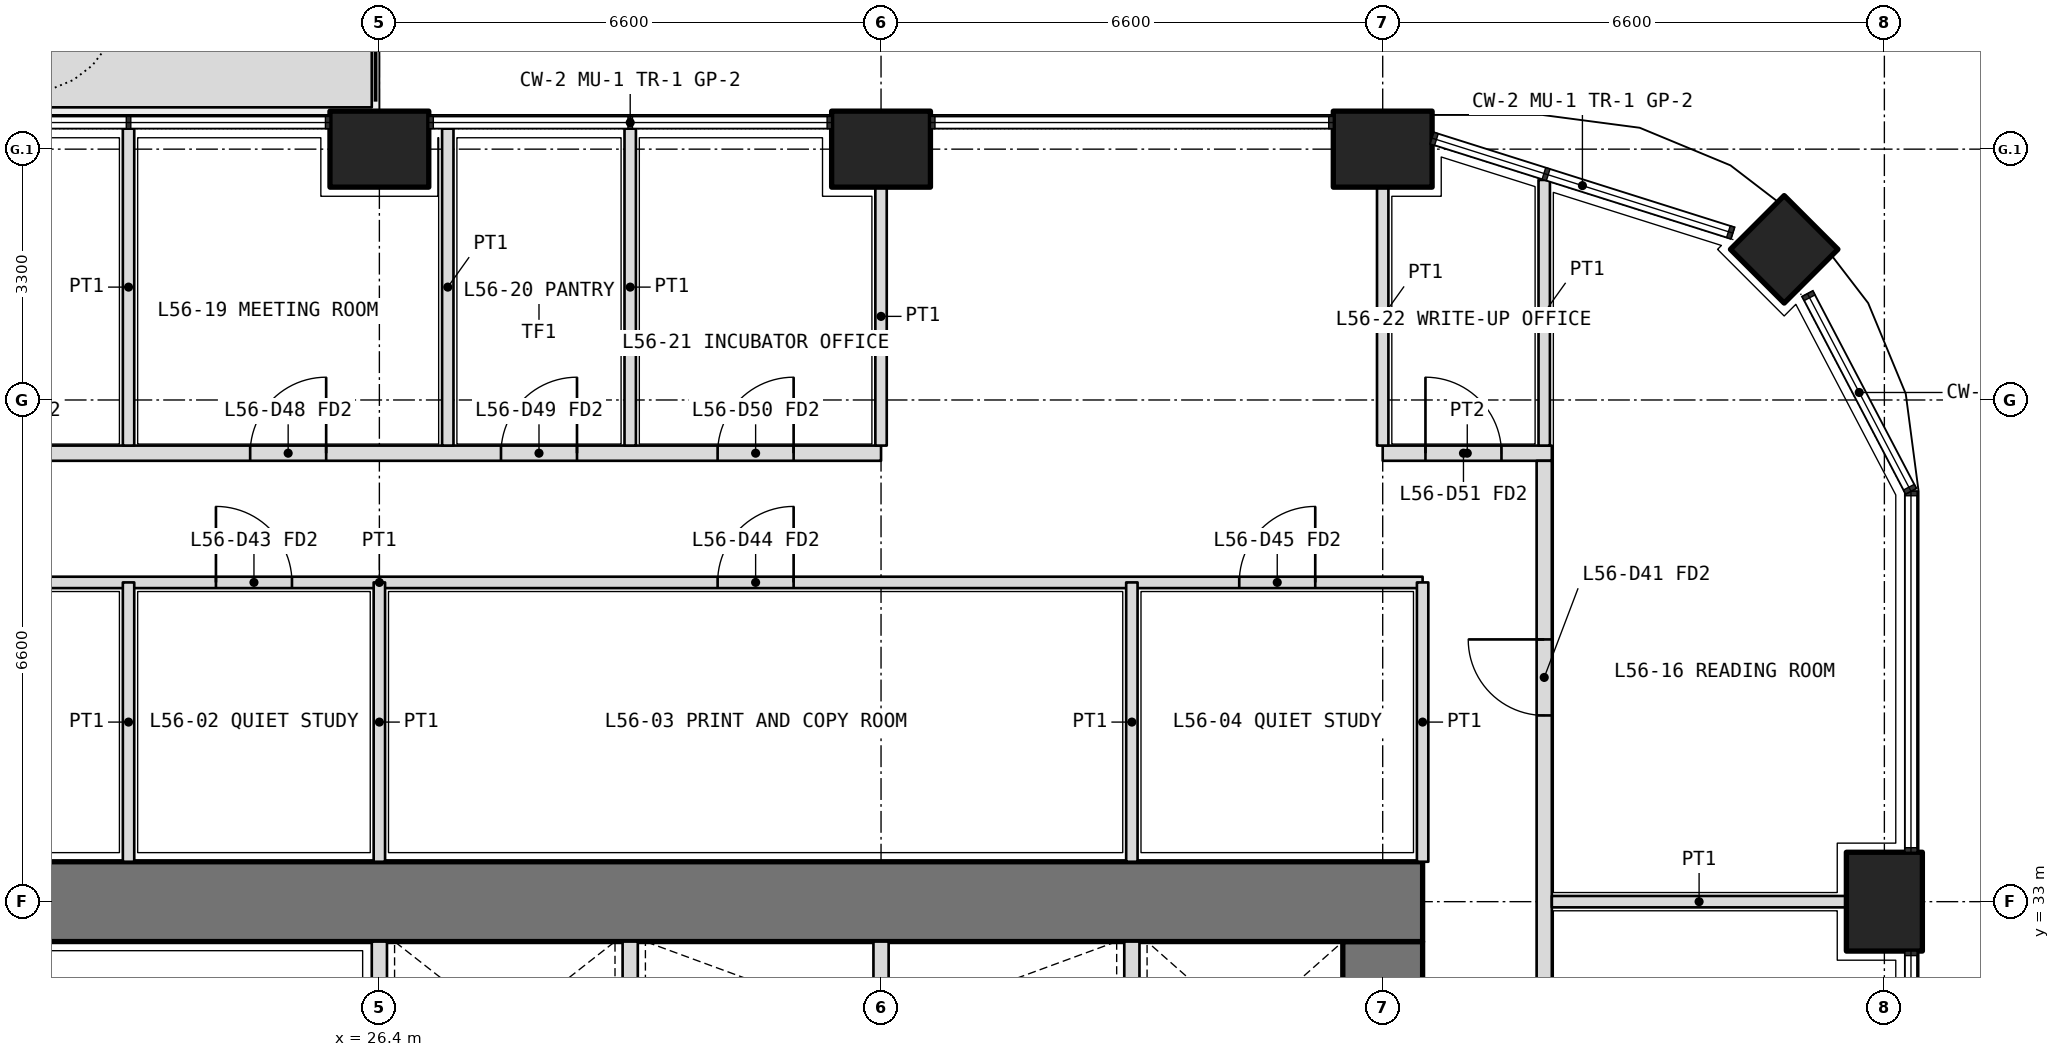
"""IFC4 building model, lengths in metres.
Left out: names, types, materials, properties, quantities, classifications, styles, units other than length and angle.
Written with IfcOpenShell. Run it as: python <this file> out.ifc"""

import sys

from ifc_helpers import new_model, si_unit, direction, frame, frame_2d, origin, origin_2d, place, context, subcontext, project, spatial, polyline, rectangle, outline, extrude, element, fill, save


model = new_model("IFC4")
c1 = context("Model", 3, precision=1e-05, world=origin(), true_north=direction((0.0, 1.0)))
c2 = subcontext(c1, "Body", "Model", "MODEL_VIEW")
j1 = project(units=[si_unit("LENGTHUNIT", "METRE"), si_unit("PLANEANGLEUNIT", "RADIAN")], contexts=[c1])
p1 = place(None, origin())
s1 = spatial("IfcSite", under=j1, at=p1, CompositionType="ELEMENT")
p2 = place(p1, origin())
s2 = spatial("IfcBuilding", under=s1, at=p2, CompositionType="ELEMENT")
p3 = place(p2, frame((0.0, 0.0, 246.0)))
s3 = spatial("IfcBuildingStorey", under=s2, at=p3, CompositionType="ELEMENT", Elevation=246.0)
p4 = place(p3, frame((44.882, 41.582, 0.0), z_axis=(0.0, 0.0, 1.0), x_axis=(0.707106781187, 0.707106781187, 0.0)))
e1 = element("IfcColumn", 1, at=p4, inside=s3, PredefinedType="COLUMN", context=c2, shape_type="SweptSolid", body=[
    extrude(rectangle(XDim=1.0, YDim=1.0, at=origin_2d()), origin(), (0.0, 0.0, 1.0), 4.2),
])
for number, where, z_axis, x_axis in (
    (2, (46.2, 33.0, 0.0), (0.0, 0.0, 1.0), (0.0, 1.0, 0.0)),
    (3, (26.4, 42.9, 0.0), (0.0, 0.0, 1.0), (1.0, 0.0, 0.0)),
    (4, (33.0, 42.9, 0.0), (0.0, 0.0, 1.0), (1.0, 0.0, 0.0)),
    (5, (39.6, 42.9, 0.0), (0.0, 0.0, 1.0), (1.0, 0.0, 0.0)),
):
    element("IfcColumn", number, at=place(p3, frame(where, z_axis=z_axis, x_axis=x_axis)), inside=s3, PredefinedType="COLUMN", context=c2, shape_type="SweptSolid", body=[
        extrude(rectangle(XDim=1.3, YDim=1.0, at=origin_2d()), origin(), (0.0, 0.0, 1.0), 4.2),
    ])
p5 = place(p3, origin())
e6 = element("IfcWall", 6, at=p5, inside=s3, PredefinedType="USERDEFINED", context=c2, shape_type="SweptSolid", body=[
    extrude(outline(polyline([(17.25, 43.45), (26.3, 43.45), (26.3, 44.45), (17.25, 44.45), (17.25, 43.45)]), holes=[polyline([(17.4, 43.6), (26.15, 43.6), (26.15, 44.3), (17.4, 44.3), (17.4, 43.6)])]), origin(), (0.0, 0.0, 1.0), 1.05),
])
p6 = place(p3, frame((39.6, 13.725, 0.0), z_axis=(0.0, 0.0, 1.0), x_axis=(0.0, 1.0, 0.0)))
e7 = element("IfcWall", 7, at=p6, inside=s3, PredefinedType="SHEAR", context=c2, shape_type="SweptSolid", body=[
    extrude(rectangle(XDim=18.75, YDim=1.05, at=frame_2d((9.375, 0.0))), origin(), (0.0, 0.0, 1.0), 4.2),
])
p7 = place(p6, frame((3.025, 0.0, 0.0)))
e8 = element("IfcOpeningElement", 8, at=p7, cuts=e7, PredefinedType="OPENING", context=c2, shape_type="SweptSolid", body=[
    extrude(rectangle(XDim=1.6, YDim=2.1, at=frame_2d((0.8, 1.05))), frame((0.0, 0.535, 0.0), z_axis=(0.0, -1.0, 0.0), x_axis=(1.0, 0.0, 0.0)), (0.0, 0.0, 1.0), 1.07),
])
p8 = place(p6, frame((13.825, 0.0, 0.0)))
e9 = element("IfcOpeningElement", 9, at=p8, cuts=e7, PredefinedType="OPENING", context=c2, shape_type="SweptSolid", body=[
    extrude(rectangle(XDim=1.6, YDim=2.1, at=frame_2d((0.8, 1.05))), frame((0.0, 0.535, 0.0), z_axis=(0.0, -1.0, 0.0), x_axis=(1.0, 0.0, 0.0)), (0.0, 0.0, 1.0), 1.07),
])
p9 = place(p3, frame((40.125, 33.0, 0.0), z_axis=(0.0, 0.0, 1.0), x_axis=(-1.0, 0.0, 0.0)))
e10 = element("IfcWall", 10, at=p9, inside=s3, PredefinedType="SHEAR", context=c2, shape_type="SweptSolid", body=[
    extrude(rectangle(XDim=27.45, YDim=1.05, at=frame_2d((13.725, 0.0))), origin(), (0.0, 0.0, 1.0), 4.2),
])
for number, where, z_axis, x_axis in (
    (11, (26.4, 30.2, 0.0), (0.0, 0.0, 1.0), (0.0, 1.0, 0.0)),
    (12, (29.7, 30.2, 0.0), (0.0, 0.0, 1.0), (0.0, 1.0, 0.0)),
    (13, (33.0, 30.2, 0.0), (0.0, 0.0, 1.0), (0.0, 1.0, 0.0)),
    (14, (36.3, 30.2, 0.0), (0.0, 0.0, 1.0), (0.0, 1.0, 0.0)),
):
    element("IfcWall", number, at=place(p3, frame(where, z_axis=z_axis, x_axis=x_axis)), inside=s3, PredefinedType="PARTITIONING", context=c2, shape_type="SweptSolid", body=[
        extrude(rectangle(XDim=2.275, YDim=0.2, at=frame_2d((1.138, 0.0))), origin(), (0.0, 0.0, 1.0), 4.2),
    ])
p10 = place(p3, frame((12.675, 37.2, 0.0), z_axis=(0.0, 0.0, 1.0), x_axis=(1.0, 0.0, 0.0)))
e15 = element("IfcWall", 15, at=p10, inside=s3, PredefinedType="PARTITIONING", context=c2, shape_type="SweptSolid", body=[
    extrude(rectangle(XDim=27.45, YDim=0.15, at=frame_2d((13.725, 0.0))), origin(), (0.0, 0.0, 1.0), 3.0),
])
p11 = place(p10, frame((4.712, 0.0, 0.0)))
e16 = element("IfcOpeningElement", 16, at=p11, cuts=e15, PredefinedType="OPENING", context=c2, shape_type="SweptSolid", body=[
    extrude(rectangle(XDim=1.0, YDim=2.1, at=frame_2d((0.5, 1.05))), frame((0.0, 0.085, 0.0), z_axis=(0.0, -1.0, 0.0), x_axis=(1.0, 0.0, 0.0)), (0.0, 0.0, 1.0), 0.17),
])
p12 = place(p10, frame((11.575, 0.0, 0.0)))
e17 = element("IfcOpeningElement", 17, at=p12, cuts=e15, PredefinedType="OPENING", context=c2, shape_type="SweptSolid", body=[
    extrude(rectangle(XDim=1.0, YDim=2.1, at=frame_2d((0.5, 1.05))), frame((0.0, 0.085, 0.0), z_axis=(0.0, -1.0, 0.0), x_axis=(1.0, 0.0, 0.0)), (0.0, 0.0, 1.0), 0.17),
])
p13 = place(p10, frame((18.175, 0.0, 0.0)))
e18 = element("IfcOpeningElement", 18, at=p13, cuts=e15, PredefinedType="OPENING", context=c2, shape_type="SweptSolid", body=[
    extrude(rectangle(XDim=1.0, YDim=2.1, at=frame_2d((0.5, 1.05))), frame((0.0, 0.085, 0.0), z_axis=(0.0, -1.0, 0.0), x_axis=(1.0, 0.0, 0.0)), (0.0, 0.0, 1.0), 0.17),
])
p14 = place(p10, frame((25.038, 0.0, 0.0)))
e19 = element("IfcOpeningElement", 19, at=p14, cuts=e15, PredefinedType="OPENING", context=c2, shape_type="SweptSolid", body=[
    extrude(rectangle(XDim=1.0, YDim=2.1, at=frame_2d((0.5, 1.05))), frame((0.0, 0.085, 0.0), z_axis=(0.0, -1.0, 0.0), x_axis=(1.0, 0.0, 0.0)), (0.0, 0.0, 1.0), 0.17),
])
p15 = place(p3, frame((40.125, 33.525, 0.0), z_axis=(0.0, 0.0, 1.0), x_axis=(0.0, 1.0, 0.0)))
e20 = element("IfcWall", 20, at=p15, inside=s3, PredefinedType="PARTITIONING", context=c2, shape_type="SweptSolid", body=[
    extrude(rectangle(XDim=3.675, YDim=0.15, at=frame_2d((1.837, 0.0))), origin(), (0.0, 0.0, 1.0), 3.0),
])
p16 = place(p3, frame((23.1, 33.525, 0.0), z_axis=(0.0, 0.0, 1.0), x_axis=(0.0, 1.0, 0.0)))
e21 = element("IfcWall", 21, at=p16, inside=s3, PredefinedType="PARTITIONING", context=c2, shape_type="SweptSolid", body=[
    extrude(rectangle(XDim=3.675, YDim=0.15, at=frame_2d((1.837, 0.0))), origin(), (0.0, 0.0, 1.0), 3.9),
])
p17 = place(p3, frame((26.4, 33.525, 0.0), z_axis=(0.0, 0.0, 1.0), x_axis=(0.0, 1.0, 0.0)))
e22 = element("IfcWall", 22, at=p17, inside=s3, PredefinedType="PARTITIONING", context=c2, shape_type="SweptSolid", body=[
    extrude(rectangle(XDim=3.675, YDim=0.15, at=frame_2d((1.837, 0.0))), origin(), (0.0, 0.0, 1.0), 3.0),
])
p18 = place(p3, frame((36.3, 33.525, 0.0), z_axis=(0.0, 0.0, 1.0), x_axis=(0.0, 1.0, 0.0)))
e23 = element("IfcWall", 23, at=p18, inside=s3, PredefinedType="PARTITIONING", context=c2, shape_type="SweptSolid", body=[
    extrude(rectangle(XDim=3.675, YDim=0.15, at=frame_2d((1.837, 0.0))), origin(), (0.0, 0.0, 1.0), 3.9),
])
p19 = place(p3, frame((10.975, 38.9, 0.0), z_axis=(0.0, 0.0, 1.0), x_axis=(1.0, 0.0, 0.0)))
e24 = element("IfcWall", 24, at=p19, inside=s3, PredefinedType="PARTITIONING", context=c2, shape_type="SweptSolid", body=[
    extrude(rectangle(XDim=22.025, YDim=0.2, at=frame_2d((11.012, 0.0))), origin(), (0.0, 0.0, 1.0), 3.0),
])
p20 = place(p19, frame((0.562, 0.0, 0.0)))
e25 = element("IfcOpeningElement", 25, at=p20, cuts=e24, PredefinedType="OPENING", context=c2, shape_type="SweptSolid", body=[
    extrude(rectangle(XDim=1.2, YDim=2.1, at=frame_2d((0.6, 1.05))), frame((0.0, 0.11, 0.0), z_axis=(0.0, -1.0, 0.0), x_axis=(1.0, 0.0, 0.0)), (0.0, 0.0, 1.0), 0.22),
])
p21 = place(p19, frame((6.675, 0.0, 0.0)))
e26 = element("IfcOpeningElement", 26, at=p21, cuts=e24, PredefinedType="OPENING", context=c2, shape_type="SweptSolid", body=[
    extrude(rectangle(XDim=1.0, YDim=2.1, at=frame_2d((0.5, 1.05))), frame((0.0, 0.11, 0.0), z_axis=(0.0, -1.0, 0.0), x_axis=(1.0, 0.0, 0.0)), (0.0, 0.0, 1.0), 0.22),
])
p22 = place(p19, frame((13.725, 0.0, 0.0)))
e27 = element("IfcOpeningElement", 27, at=p22, cuts=e24, PredefinedType="OPENING", context=c2, shape_type="SweptSolid", body=[
    extrude(rectangle(XDim=1.0, YDim=2.1, at=frame_2d((0.5, 1.05))), frame((0.0, 0.11, 0.0), z_axis=(0.0, -1.0, 0.0), x_axis=(1.0, 0.0, 0.0)), (0.0, 0.0, 1.0), 0.22),
])
p23 = place(p19, frame((17.025, 0.0, 0.0)))
e28 = element("IfcOpeningElement", 28, at=p23, cuts=e24, PredefinedType="OPENING", context=c2, shape_type="SweptSolid", body=[
    extrude(rectangle(XDim=1.0, YDim=2.1, at=frame_2d((0.5, 1.05))), frame((0.0, 0.11, 0.0), z_axis=(0.0, -1.0, 0.0), x_axis=(1.0, 0.0, 0.0)), (0.0, 0.0, 1.0), 0.22),
])
p24 = place(p19, frame((19.875, 0.0, 0.0)))
e29 = element("IfcOpeningElement", 29, at=p24, cuts=e24, PredefinedType="OPENING", context=c2, shape_type="SweptSolid", body=[
    extrude(rectangle(XDim=1.0, YDim=2.1, at=frame_2d((0.5, 1.05))), frame((0.0, 0.11, 0.0), z_axis=(0.0, -1.0, 0.0), x_axis=(1.0, 0.0, 0.0)), (0.0, 0.0, 1.0), 0.22),
])
p25 = place(p3, frame((39.6, 38.9, 0.0), z_axis=(0.0, 0.0, 1.0), x_axis=(1.0, 0.0, 0.0)))
e30 = element("IfcWall", 30, at=p25, inside=s3, PredefinedType="PARTITIONING", context=c2, shape_type="SweptSolid", body=[
    extrude(rectangle(XDim=2.225, YDim=0.2, at=frame_2d((1.112, 0.0))), origin(), (0.0, 0.0, 1.0), 3.0),
])
p26 = place(p25, frame((0.562, 0.0, 0.0)))
e31 = element("IfcOpeningElement", 31, at=p26, cuts=e30, PredefinedType="OPENING", context=c2, shape_type="SweptSolid", body=[
    extrude(rectangle(XDim=1.0, YDim=2.1, at=frame_2d((0.5, 1.05))), frame((0.0, 0.11, 0.0), z_axis=(0.0, -1.0, 0.0), x_axis=(1.0, 0.0, 0.0)), (0.0, 0.0, 1.0), 0.22),
])
p27 = place(p3, frame((41.725, 7.4, 0.0), z_axis=(0.0, 0.0, 1.0), x_axis=(0.0, 1.0, 0.0)))
e32 = element("IfcWall", 32, at=p27, inside=s3, PredefinedType="PARTITIONING", context=c2, shape_type="SweptSolid", body=[
    extrude(rectangle(XDim=31.4, YDim=0.2, at=frame_2d((15.7, 0.0))), origin(), (0.0, 0.0, 1.0), 3.0),
])
p28 = place(p27, frame((5.65, 0.0, 0.0)))
e33 = element("IfcOpeningElement", 33, at=p28, cuts=e32, PredefinedType="OPENING", context=c2, shape_type="SweptSolid", body=[
    extrude(rectangle(XDim=1.0, YDim=2.1, at=frame_2d((0.5, 1.05))), frame((0.0, 0.11, 0.0), z_axis=(0.0, -1.0, 0.0), x_axis=(1.0, 0.0, 0.0)), (0.0, 0.0, 1.0), 0.22),
])
p29 = place(p27, frame((13.4, 0.0, 0.0)))
e34 = element("IfcOpeningElement", 34, at=p29, cuts=e32, PredefinedType="OPENING", context=c2, shape_type="SweptSolid", body=[
    extrude(rectangle(XDim=1.0, YDim=2.1, at=frame_2d((0.5, 1.05))), frame((0.0, 0.11, 0.0), z_axis=(0.0, -1.0, 0.0), x_axis=(1.0, 0.0, 0.0)), (0.0, 0.0, 1.0), 0.22),
])
p30 = place(p27, frame((16.75, 0.0, 0.0)))
e35 = element("IfcOpeningElement", 35, at=p30, cuts=e32, PredefinedType="OPENING", context=c2, shape_type="SweptSolid", body=[
    extrude(rectangle(XDim=0.9, YDim=2.1, at=frame_2d((0.45, 1.05))), frame((0.0, 0.11, 0.0), z_axis=(0.0, -1.0, 0.0), x_axis=(1.0, 0.0, 0.0)), (0.0, 0.0, 1.0), 0.22),
])
p31 = place(p27, frame((21.8, 0.0, 0.0)))
e36 = element("IfcOpeningElement", 36, at=p31, cuts=e32, PredefinedType="OPENING", context=c2, shape_type="SweptSolid", body=[
    extrude(rectangle(XDim=1.0, YDim=2.1, at=frame_2d((0.5, 1.05))), frame((0.0, 0.11, 0.0), z_axis=(0.0, -1.0, 0.0), x_axis=(1.0, 0.0, 0.0)), (0.0, 0.0, 1.0), 0.22),
])
p32 = place(p27, frame((28.05, 0.0, 0.0)))
e37 = element("IfcOpeningElement", 37, at=p32, cuts=e32, PredefinedType="OPENING", context=c2, shape_type="SweptSolid", body=[
    extrude(rectangle(XDim=1.0, YDim=2.1, at=frame_2d((0.5, 1.05))), frame((0.0, 0.11, 0.0), z_axis=(0.0, -1.0, 0.0), x_axis=(1.0, 0.0, 0.0)), (0.0, 0.0, 1.0), 0.22),
])
p33 = place(p3, frame((41.725, 42.495, 0.0), z_axis=(0.0, 0.0, 1.0), x_axis=(0.0, -1.0, 0.0)))
e38 = element("IfcWall", 38, at=p33, inside=s3, PredefinedType="PARTITIONING", context=c2, shape_type="SweptSolid", body=[
    extrude(rectangle(XDim=3.495, YDim=0.15, at=frame_2d((1.748, 0.0))), origin(), (0.0, 0.0, 1.0), 2.7),
])
p34 = place(p3, frame((45.7, 33.0, 0.0), z_axis=(0.0, 0.0, 1.0), x_axis=(-1.0, 0.0, 0.0)))
e39 = element("IfcWall", 39, at=p34, inside=s3, PredefinedType="PARTITIONING", context=c2, shape_type="SweptSolid", body=[
    extrude(rectangle(XDim=3.875, YDim=0.15, at=frame_2d((1.938, 0.0))), origin(), (0.0, 0.0, 1.0), 3.0),
])
for number, where, z_axis, x_axis in (
    (40, (27.3, 43.17, 0.0), (0.0, 0.0, 1.0), (0.0, -1.0, 0.0)),
    (41, (29.7, 43.17, 0.0), (0.0, 0.0, 1.0), (0.0, -1.0, 0.0)),
    (42, (23.1, 43.17, 0.0), (0.0, 0.0, 1.0), (0.0, -1.0, 0.0)),
):
    element("IfcWall", number, at=place(p3, frame(where, z_axis=z_axis, x_axis=x_axis)), inside=s3, PredefinedType="PARTITIONING", context=c2, shape_type="SweptSolid", body=[
        extrude(rectangle(XDim=4.17, YDim=0.15, at=frame_2d((2.085, 0.0))), origin(), (0.0, 0.0, 1.0), 2.7),
    ])
for number, where, z_axis, x_axis in (
    (43, (33.0, 42.4, 0.0), (0.0, 0.0, 1.0), (0.0, -1.0, 0.0)),
    (44, (39.6, 42.4, 0.0), (0.0, 0.0, 1.0), (0.0, -1.0, 0.0)),
):
    element("IfcWall", number, at=place(p3, frame(where, z_axis=z_axis, x_axis=x_axis)), inside=s3, PredefinedType="PARTITIONING", context=c2, shape_type="SweptSolid", body=[
        extrude(rectangle(XDim=3.4, YDim=0.15, at=frame_2d((1.7, 0.0))), origin(), (0.0, 0.0, 1.0), 3.0),
    ])
p35 = place(p12, origin())
e45 = element("IfcDoor", 45, at=p35, inside=s3, OperationType="SINGLE_SWING_LEFT", PredefinedType="DOOR", context=c2, shape_type="SweptSolid", body=[
    extrude(rectangle(XDim=1.0, YDim=2.1, at=frame_2d((0.5, 1.05))), frame((0.0, 0.025, 0.0), z_axis=(0.0, -1.0, 0.0), x_axis=(1.0, 0.0, 0.0)), (0.0, 0.0, 1.0), 0.05),
])
fill(e17, e45)
p36 = place(p13, origin())
e46 = element("IfcDoor", 46, at=p36, inside=s3, OperationType="SINGLE_SWING_RIGHT", PredefinedType="DOOR", context=c2, shape_type="SweptSolid", body=[
    extrude(rectangle(XDim=1.0, YDim=2.1, at=frame_2d((0.5, 1.05))), frame((0.0, 0.025, 0.0), z_axis=(0.0, -1.0, 0.0), x_axis=(1.0, 0.0, 0.0)), (0.0, 0.0, 1.0), 0.05),
])
fill(e18, e46)
p37 = place(p14, origin())
e47 = element("IfcDoor", 47, at=p37, inside=s3, OperationType="SINGLE_SWING_RIGHT", PredefinedType="DOOR", context=c2, shape_type="SweptSolid", body=[
    extrude(rectangle(XDim=1.0, YDim=2.1, at=frame_2d((0.5, 1.05))), frame((0.0, 0.025, 0.0), z_axis=(0.0, -1.0, 0.0), x_axis=(1.0, 0.0, 0.0)), (0.0, 0.0, 1.0), 0.05),
])
fill(e19, e47)
p38 = place(p32, origin())
e48 = element("IfcDoor", 48, at=p38, inside=s3, OperationType="SINGLE_SWING_RIGHT", PredefinedType="DOOR", context=c2, shape_type="SweptSolid", body=[
    extrude(rectangle(XDim=1.0, YDim=2.1, at=frame_2d((0.5, 1.05))), frame((0.0, 0.025, 0.0), z_axis=(0.0, -1.0, 0.0), x_axis=(1.0, 0.0, 0.0)), (0.0, 0.0, 1.0), 0.05),
])
fill(e37, e48)
p39 = place(p22, origin())
e49 = element("IfcDoor", 49, at=p39, inside=s3, OperationType="SINGLE_SWING_RIGHT", PredefinedType="DOOR", context=c2, shape_type="SweptSolid", body=[
    extrude(rectangle(XDim=1.0, YDim=2.1, at=frame_2d((0.5, 1.05))), frame((0.0, 0.025, 0.0), z_axis=(0.0, -1.0, 0.0), x_axis=(1.0, 0.0, 0.0)), (0.0, 0.0, 1.0), 0.05),
])
fill(e27, e49)
p40 = place(p23, origin())
e50 = element("IfcDoor", 50, at=p40, inside=s3, OperationType="SINGLE_SWING_RIGHT", PredefinedType="DOOR", context=c2, shape_type="SweptSolid", body=[
    extrude(rectangle(XDim=1.0, YDim=2.1, at=frame_2d((0.5, 1.05))), frame((0.0, 0.025, 0.0), z_axis=(0.0, -1.0, 0.0), x_axis=(1.0, 0.0, 0.0)), (0.0, 0.0, 1.0), 0.05),
])
fill(e28, e50)
p41 = place(p24, origin())
e51 = element("IfcDoor", 51, at=p41, inside=s3, OperationType="SINGLE_SWING_RIGHT", PredefinedType="DOOR", context=c2, shape_type="SweptSolid", body=[
    extrude(rectangle(XDim=1.0, YDim=2.1, at=frame_2d((0.5, 1.05))), frame((0.0, 0.025, 0.0), z_axis=(0.0, -1.0, 0.0), x_axis=(1.0, 0.0, 0.0)), (0.0, 0.0, 1.0), 0.05),
])
fill(e29, e51)
p42 = place(p26, origin())
e52 = element("IfcDoor", 52, at=p42, inside=s3, OperationType="SINGLE_SWING_LEFT", PredefinedType="DOOR", context=c2, shape_type="SweptSolid", body=[
    extrude(rectangle(XDim=1.0, YDim=2.1, at=frame_2d((0.5, 1.05))), frame((0.0, 0.025, 0.0), z_axis=(0.0, -1.0, 0.0), x_axis=(1.0, 0.0, 0.0)), (0.0, 0.0, 1.0), 0.05),
])
fill(e31, e52)
save(model, sys.argv[1])
